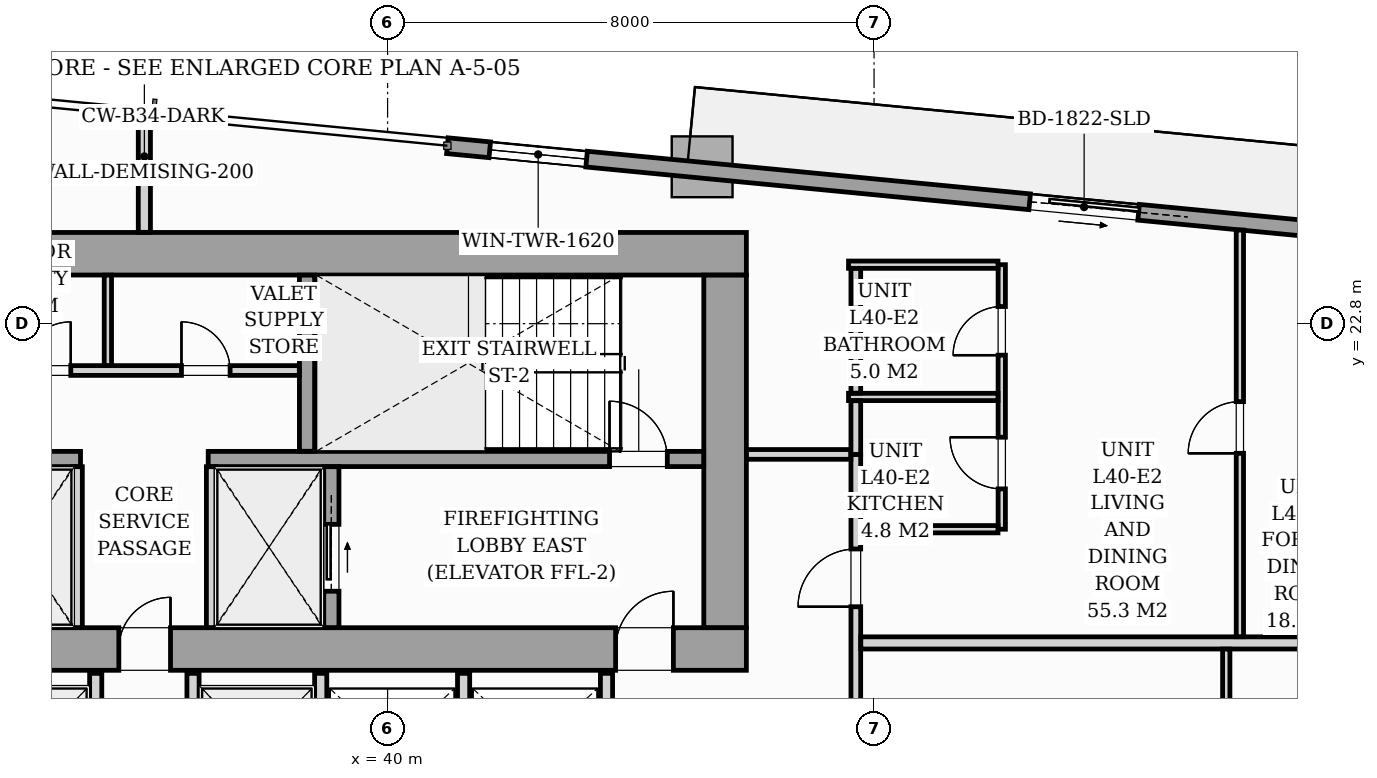
"""IFC4 building model, lengths in metres.
Left out: names, types, materials, properties, quantities, classifications, styles, units other than length and angle.
Written with IfcOpenShell. Run it as: python <this file> out.ifc"""

import sys

from ifc_helpers import new_model, si_unit, direction, frame, frame_2d, origin, origin_2d, place, context, subcontext, project, spatial, rectangle, i_section, extrude, source, transform, mapped, element, fill, save


model = new_model("IFC4")
c1 = context("Model", 3, precision=1e-05, world=origin(), true_north=direction((0.0, 1.0)))
c2 = subcontext(c1, "Body", "Model", "MODEL_VIEW")
j1 = project(units=[si_unit("LENGTHUNIT", "METRE"), si_unit("PLANEANGLEUNIT", "RADIAN")], contexts=[c1])
p1 = place(None, origin())
s1 = spatial("IfcSite", under=j1, at=p1, CompositionType="ELEMENT")
p2 = place(p1, origin())
s2 = spatial("IfcBuilding", under=s1, at=p2, CompositionType="ELEMENT")
p3 = place(p2, frame((0.0, 0.0, 140.6)))
s3 = spatial("IfcBuildingStorey", under=s2, at=p3, CompositionType="ELEMENT", Elevation=140.6)
m1 = source(origin(), c2, "Body", "SweptSolid", [
    extrude(i_section(OverallWidth=0.421, OverallDepth=0.465, WebThickness=0.045, FlangeThickness=0.073, FilletRadius=0.018, at=origin_2d()), origin(), (0.0, 0.0, 1.0), 3.196),
])
for number, where, z_axis, x_axis in (
    (1, (38.88, 17.4, 0.002), (0.0, 0.0, 1.0), (1.0, 0.0, 0.0)),
    (2, (45.6, 17.4, 0.002), (0.0, 0.0, 1.0), (1.0, 0.0, 0.0)),
    (3, (38.88, 24.0, 0.002), (0.0, 0.0, 1.0), (1.0, 0.0, 0.0)),
    (4, (45.6, 24.0, 0.002), (0.0, 0.0, 1.0), (1.0, 0.0, 0.0)),
):
    element("IfcColumn", number, at=place(p3, frame(where, z_axis=z_axis, x_axis=x_axis)), inside=s3, PredefinedType="PILASTER", context=c2, shape_type="MappedRepresentation", body=[
        mapped(m1, transform((0.0, 0.0, 0.0), scale=1.0)),
    ])
m2 = source(origin(), c2, "Body", "SweptSolid", [
    extrude(rectangle(XDim=1.0, YDim=1.0, at=origin_2d()), origin(), (0.0, 0.0, 1.0), 3.196),
])
p4 = place(p3, frame((45.173, 25.38, 0.002), z_axis=(0.0, 0.0, 1.0), x_axis=(0.995396198367, -0.09584575252, 0.0)))
e5 = element("IfcColumn", 5, at=p4, inside=s3, PredefinedType="COLUMN", context=c2, shape_type="MappedRepresentation", body=[
    mapped(m2, transform((0.0, 0.0, 0.0), scale=1.0)),
])
p5 = place(p3, frame((40.983, 25.727, 0.0), z_axis=(0.0, 0.0, 1.0), x_axis=(0.995395844771, -0.095849424686, 0.0)))
e6 = element("IfcWall", 6, at=p5, inside=s3, PredefinedType="STANDARD", context=c2, shape_type="SweptSolid", body=[
    extrude(rectangle(XDim=17.01, YDim=0.26, at=frame_2d((8.505, 0.0))), origin(), (0.0, 0.0, 1.0), 2.94),
])
p6 = place(p5, frame((9.62, 0.0, 0.0)))
e7 = element("IfcOpeningElement", 7, at=p6, cuts=e6, PredefinedType="OPENING", context=c2, shape_type="SweptSolid", body=[
    extrude(rectangle(XDim=1.8, YDim=2.06, at=frame_2d((0.9, 1.03))), frame((0.0, 0.14, 0.0), z_axis=(0.0, -1.0, 0.0), x_axis=(1.0, 0.0, 0.0)), (0.0, 0.0, 1.0), 0.28),
])
p7 = place(p5, frame((0.7, 0.0, 0.65)))
e8 = element("IfcOpeningElement", 8, at=p7, cuts=e6, PredefinedType="OPENING", context=c2, shape_type="SweptSolid", body=[
    extrude(rectangle(XDim=1.6, YDim=1.5, at=frame_2d((0.8, 0.75))), frame((0.0, 0.14, 0.0), z_axis=(0.0, -1.0, 0.0), x_axis=(1.0, 0.0, 0.0)), (0.0, 0.0, 1.0), 0.28),
])
p8 = place(p3, frame((26.1, 17.45, 0.0), z_axis=(0.0, 0.0, 1.0), x_axis=(1.0, 0.0, 0.0)))
e9 = element("IfcWall", 9, at=p8, inside=s3, PredefinedType="SHEAR", context=c2, shape_type="SweptSolid", body=[
    extrude(rectangle(XDim=19.8, YDim=0.7, at=frame_2d((9.9, 0.0))), origin(), (0.0, 0.0, 1.0), 3.2),
])
p9 = place(p8, frame((1.05, 0.0, 0.0)))
e10 = element("IfcOpeningElement", 10, at=p9, cuts=e9, PredefinedType="OPENING", context=c2, shape_type="SweptSolid", body=[
    extrude(rectangle(XDim=0.95, YDim=2.06, at=frame_2d((0.475, 1.03))), frame((0.0, 0.36, 0.0), z_axis=(0.0, -1.0, 0.0), x_axis=(1.0, 0.0, 0.0)), (0.0, 0.0, 1.0), 0.72),
])
p10 = place(p8, frame((9.48, 0.0, 0.0)))
e11 = element("IfcOpeningElement", 11, at=p10, cuts=e9, PredefinedType="OPENING", context=c2, shape_type="SweptSolid", body=[
    extrude(rectangle(XDim=0.85, YDim=2.0, at=frame_2d((0.425, 1.0))), frame((0.0, 0.36, 0.0), z_axis=(0.0, -1.0, 0.0), x_axis=(1.0, 0.0, 0.0)), (0.0, 0.0, 1.0), 0.72),
])
p11 = place(p8, frame((17.65, 0.0, 0.0)))
e12 = element("IfcOpeningElement", 12, at=p11, cuts=e9, PredefinedType="OPENING", context=c2, shape_type="SweptSolid", body=[
    extrude(rectangle(XDim=0.95, YDim=2.06, at=frame_2d((0.475, 1.03))), frame((0.0, 0.36, 0.0), z_axis=(0.0, -1.0, 0.0), x_axis=(1.0, 0.0, 0.0)), (0.0, 0.0, 1.0), 0.72),
])
p12 = place(p3, frame((26.1, 23.95, 0.0), z_axis=(0.0, 0.0, 1.0), x_axis=(1.0, 0.0, 0.0)))
e13 = element("IfcWall", 13, at=p12, inside=s3, PredefinedType="SHEAR", context=c2, shape_type="SweptSolid", body=[
    extrude(rectangle(XDim=19.8, YDim=0.7, at=frame_2d((9.9, 0.0))), origin(), (0.0, 0.0, 1.0), 3.2),
])
p13 = place(p3, frame((45.55, 17.802, 0.0), z_axis=(0.0, 0.0, 1.0), x_axis=(0.0, 1.0, 0.0)))
e14 = element("IfcWall", 14, at=p13, inside=s3, PredefinedType="SHEAR", context=c2, shape_type="SweptSolid", body=[
    extrude(rectangle(XDim=5.796, YDim=0.7, at=frame_2d((2.898, 0.0))), origin(), (0.0, 0.0, 1.0), 3.2),
])
p14 = place(p3, frame((26.802, 20.575, 0.0), z_axis=(0.0, 0.0, 1.0), x_axis=(1.0, 0.0, 0.0)))
e15 = element("IfcWall", 15, at=p14, inside=s3, PredefinedType="SOLIDWALL", context=c2, shape_type="SweptSolid", body=[
    extrude(rectangle(XDim=8.148, YDim=0.25, at=frame_2d((4.074, 0.0))), origin(), (0.0, 0.0, 1.0), 3.2),
])
p15 = place(p14, frame((0.348, 0.0, 0.0)))
e16 = element("IfcOpeningElement", 16, at=p15, cuts=e15, PredefinedType="OPENING", context=c2, shape_type="SweptSolid", body=[
    extrude(rectangle(XDim=0.95, YDim=2.06, at=frame_2d((0.475, 1.03))), frame((0.0, 0.135, 0.0), z_axis=(0.0, -1.0, 0.0), x_axis=(1.0, 0.0, 0.0)), (0.0, 0.0, 1.0), 0.27),
])
p16 = place(p3, frame((37.05, 20.575, 0.0), z_axis=(0.0, 0.0, 1.0), x_axis=(1.0, 0.0, 0.0)))
e17 = element("IfcWall", 17, at=p16, inside=s3, PredefinedType="SOLIDWALL", context=c2, shape_type="SweptSolid", body=[
    extrude(rectangle(XDim=8.148, YDim=0.25, at=frame_2d((4.074, 0.0))), origin(), (0.0, 0.0, 1.0), 3.2),
])
p17 = place(p16, frame((6.6, 0.0, 0.0)))
e18 = element("IfcOpeningElement", 18, at=p17, cuts=e17, PredefinedType="OPENING", context=c2, shape_type="SweptSolid", body=[
    extrude(rectangle(XDim=0.95, YDim=2.06, at=frame_2d((0.475, 1.03))), frame((0.0, 0.135, 0.0), z_axis=(0.0, -1.0, 0.0), x_axis=(1.0, 0.0, 0.0)), (0.0, 0.0, 1.0), 0.27),
])
p18 = place(p3, frame((38.675, 20.702, 0.0), z_axis=(0.0, 0.0, 1.0), x_axis=(0.0, 1.0, 0.0)))
e19 = element("IfcWall", 19, at=p18, inside=s3, PredefinedType="SOLIDWALL", context=c2, shape_type="SweptSolid", body=[
    extrude(rectangle(XDim=2.896, YDim=0.25, at=frame_2d((1.448, 0.0))), origin(), (0.0, 0.0, 1.0), 3.2),
])
for number, where, z_axis, x_axis in (
    (20, (34.9, 17.802, 0.0), (0.0, 0.0, 1.0), (0.0, 1.0, 0.0)),
    (21, (37.1, 17.802, 0.0), (0.0, 0.0, 1.0), (0.0, 1.0, 0.0)),
):
    element("IfcWall", number, at=place(p3, frame(where, z_axis=z_axis, x_axis=x_axis)), inside=s3, PredefinedType="PARTITIONING", context=c2, shape_type="SweptSolid", body=[
        extrude(rectangle(XDim=2.646, YDim=0.16, at=frame_2d((1.323, 0.0))), origin(), (0.0, 0.0, 1.0), 2.94),
    ])
p19 = place(p3, frame((39.075, 17.802, 0.0), z_axis=(0.0, 0.0, 1.0), x_axis=(0.0, 1.0, 0.0)))
e22 = element("IfcWall", 22, at=p19, inside=s3, PredefinedType="SOLIDWALL", context=c2, shape_type="SweptSolid", body=[
    extrude(rectangle(XDim=2.646, YDim=0.25, at=frame_2d((1.323, 0.0))), origin(), (0.0, 0.0, 1.0), 3.2),
])
p20 = place(p19, frame((0.598, 0.0, 0.0)))
e23 = element("IfcOpeningElement", 23, at=p20, cuts=e22, PredefinedType="OPENING", context=c2, shape_type="SweptSolid", body=[
    extrude(rectangle(XDim=1.1, YDim=2.08, at=frame_2d((0.55, 1.04))), frame((0.0, 0.135, 0.0), z_axis=(0.0, -1.0, 0.0), x_axis=(1.0, 0.0, 0.0)), (0.0, 0.0, 1.0), 0.27),
])
p21 = place(p3, frame((33.452, 22.03, 0.0), z_axis=(0.0, 0.0, 1.0), x_axis=(1.0, 0.0, 0.0)))
e24 = element("IfcWall", 24, at=p21, inside=s3, PredefinedType="PARTITIONING", context=c2, shape_type="SweptSolid", body=[
    extrude(rectangle(XDim=5.096, YDim=0.16, at=frame_2d((2.548, 0.0))), origin(), (0.0, 0.0, 1.0), 2.94),
])
p22 = place(p21, frame((0.538, 0.0, 0.0)))
e25 = element("IfcOpeningElement", 25, at=p22, cuts=e24, PredefinedType="OPENING", context=c2, shape_type="SweptSolid", body=[
    extrude(rectangle(XDim=0.8, YDim=2.05, at=frame_2d((0.4, 1.025))), frame((0.0, 0.09, 0.0), z_axis=(0.0, -1.0, 0.0), x_axis=(1.0, 0.0, 0.0)), (0.0, 0.0, 1.0), 0.18),
])
p23 = place(p21, frame((3.158, 0.0, 0.0)))
e26 = element("IfcOpeningElement", 26, at=p23, cuts=e24, PredefinedType="OPENING", context=c2, shape_type="SweptSolid", body=[
    extrude(rectangle(XDim=0.8, YDim=2.05, at=frame_2d((0.4, 1.025))), frame((0.0, 0.09, 0.0), z_axis=(0.0, -1.0, 0.0), x_axis=(1.0, 0.0, 0.0)), (0.0, 0.0, 1.0), 0.18),
])
p24 = place(p3, frame((35.4, 22.112, 0.0), z_axis=(0.0, 0.0, 1.0), x_axis=(0.0, 1.0, 0.0)))
e27 = element("IfcWall", 27, at=p24, inside=s3, PredefinedType="PARTITIONING", context=c2, shape_type="SweptSolid", body=[
    extrude(rectangle(XDim=1.486, YDim=0.12, at=frame_2d((0.743, 0.0))), origin(), (0.0, 0.0, 1.0), 2.94),
])
for number, where, z_axis, x_axis in (
    (28, (35.2, 14.75, 0.0), (0.0, 0.0, 1.0), (0.0, 1.0, 0.0)),
    (29, (36.8, 14.75, 0.0), (0.0, 0.0, 1.0), (0.0, 1.0, 0.0)),
    (30, (38.9, 14.75, 0.0), (0.0, 0.0, 1.0), (0.0, 1.0, 0.0)),
    (31, (41.25, 14.75, 0.0), (0.0, 0.0, 1.0), (0.0, 1.0, 0.0)),
    (32, (43.6, 14.75, 0.0), (0.0, 0.0, 1.0), (0.0, 1.0, 0.0)),
):
    element("IfcWall", number, at=place(p3, frame(where, z_axis=z_axis, x_axis=x_axis)), inside=s3, PredefinedType="PARTITIONING", context=c2, shape_type="SweptSolid", body=[
        extrude(rectangle(XDim=2.3, YDim=0.2, at=frame_2d((1.15, 0.0))), origin(), (0.0, 0.0, 1.0), 2.94),
    ])
p25 = place(p3, frame((47.7, 12.832, 0.0), z_axis=(0.0, 0.0, 1.0), x_axis=(0.0, 1.0, 0.0)))
e33 = element("IfcWall", 33, at=p25, inside=s3, PredefinedType="PARTITIONING", context=c2, shape_type="SweptSolid", body=[
    extrude(rectangle(XDim=7.818, YDim=0.16, at=frame_2d((3.909, 0.0))), origin(), (0.0, 0.0, 1.0), 2.94),
])
p26 = place(p25, frame((0.493, 0.0, 0.0)))
e34 = element("IfcOpeningElement", 34, at=p26, cuts=e33, PredefinedType="OPENING", context=c2, shape_type="SweptSolid", body=[
    extrude(rectangle(XDim=0.95, YDim=2.06, at=frame_2d((0.475, 1.03))), frame((0.0, 0.09, 0.0), z_axis=(0.0, -1.0, 0.0), x_axis=(1.0, 0.0, 0.0)), (0.0, 0.0, 1.0), 0.18),
])
p27 = place(p25, frame((5.313, 0.0, 0.0)))
e35 = element("IfcOpeningElement", 35, at=p27, cuts=e33, PredefinedType="OPENING", context=c2, shape_type="SweptSolid", body=[
    extrude(rectangle(XDim=0.95, YDim=2.06, at=frame_2d((0.475, 1.03))), frame((0.0, 0.09, 0.0), z_axis=(0.0, -1.0, 0.0), x_axis=(1.0, 0.0, 0.0)), (0.0, 0.0, 1.0), 0.18),
])
p28 = place(p3, frame((36.0, 24.302, 0.0), z_axis=(0.0, 0.0, 1.0), x_axis=(0.0, 1.0, 0.0)))
e36 = element("IfcWall", 36, at=p28, inside=s3, PredefinedType="PARTITIONING", context=c2, shape_type="SweptSolid", body=[
    extrude(rectangle(XDim=1.955, YDim=0.2, at=frame_2d((0.978, 0.0))), origin(), (0.0, 0.0, 1.0), 2.94),
])
p29 = place(p3, frame((45.902, 20.65, 0.0), z_axis=(0.0, 0.0, 1.0), x_axis=(1.0, 0.0, 0.0)))
e37 = element("IfcWall", 37, at=p29, inside=s3, PredefinedType="PARTITIONING", context=c2, shape_type="SweptSolid", body=[
    extrude(rectangle(XDim=1.716, YDim=0.16, at=frame_2d((0.858, 0.0))), origin(), (0.0, 0.0, 1.0), 2.94),
])
p30 = place(p3, frame((47.782, 17.55, 0.0), z_axis=(0.0, 0.0, 1.0), x_axis=(1.0, 0.0, 0.0)))
e38 = element("IfcWall", 38, at=p30, inside=s3, PredefinedType="PARTITIONING", context=c2, shape_type="SweptSolid", body=[
    extrude(rectangle(XDim=11.934, YDim=0.2, at=frame_2d((5.967, 0.0))), origin(), (0.0, 0.0, 1.0), 2.94),
])
p31 = place(p3, frame((53.792, 7.081, 0.0), z_axis=(0.0, 0.0, 1.0), x_axis=(0.0, 1.0, 0.0)))
e39 = element("IfcWall", 39, at=p31, inside=s3, PredefinedType="PARTITIONING", context=c2, shape_type="SweptSolid", body=[
    extrude(rectangle(XDim=10.367, YDim=0.12, at=frame_2d((5.184, 0.0))), origin(), (0.0, 0.0, 1.0), 2.94),
])
p32 = place(p31, frame((4.758, 0.0, 0.0)))
e40 = element("IfcOpeningElement", 40, at=p32, cuts=e39, PredefinedType="OPENING", context=c2, shape_type="SweptSolid", body=[
    extrude(rectangle(XDim=0.85, YDim=2.05, at=frame_2d((0.425, 1.025))), frame((0.0, 0.07, 0.0), z_axis=(0.0, -1.0, 0.0), x_axis=(1.0, 0.0, 0.0)), (0.0, 0.0, 1.0), 0.14),
])
p33 = place(p3, frame((50.1, 19.42, 0.0), z_axis=(0.0, 0.0, 1.0), x_axis=(0.0, 1.0, 0.0)))
e41 = element("IfcWall", 41, at=p33, inside=s3, PredefinedType="PARTITIONING", context=c2, shape_type="SweptSolid", body=[
    extrude(rectangle(XDim=4.35, YDim=0.12, at=frame_2d((2.175, 0.0))), origin(), (0.0, 0.0, 1.0), 2.94),
])
p34 = place(p33, frame((0.663, 0.0, 0.0)))
e42 = element("IfcOpeningElement", 42, at=p34, cuts=e41, PredefinedType="OPENING", context=c2, shape_type="SweptSolid", body=[
    extrude(rectangle(XDim=0.85, YDim=2.05, at=frame_2d((0.425, 1.025))), frame((0.0, 0.07, 0.0), z_axis=(0.0, -1.0, 0.0), x_axis=(1.0, 0.0, 0.0)), (0.0, 0.0, 1.0), 0.14),
])
p35 = place(p33, frame((2.862, 0.0, 0.0)))
e43 = element("IfcOpeningElement", 43, at=p35, cuts=e41, PredefinedType="OPENING", context=c2, shape_type="SweptSolid", body=[
    extrude(rectangle(XDim=0.8, YDim=2.02, at=frame_2d((0.4, 1.01))), frame((0.0, 0.07, 0.0), z_axis=(0.0, -1.0, 0.0), x_axis=(1.0, 0.0, 0.0)), (0.0, 0.0, 1.0), 0.14),
])
p36 = place(p3, frame((47.58, 21.595, 0.0), z_axis=(0.0, 0.0, 1.0), x_axis=(1.0, 0.0, 0.0)))
e44 = element("IfcWall", 44, at=p36, inside=s3, PredefinedType="PARTITIONING", context=c2, shape_type="SweptSolid", body=[
    extrude(rectangle(XDim=2.458, YDim=0.12, at=frame_2d((1.229, 0.0))), origin(), (0.0, 0.0, 1.0), 2.94),
])
p37 = place(p3, frame((47.782, 19.42, 0.0), z_axis=(0.0, 0.0, 1.0), x_axis=(1.0, 0.0, 0.0)))
e45 = element("IfcWall", 45, at=p37, inside=s3, PredefinedType="PARTITIONING", context=c2, shape_type="SweptSolid", body=[
    extrude(rectangle(XDim=2.256, YDim=0.12, at=frame_2d((1.128, 0.0))), origin(), (0.0, 0.0, 1.0), 2.94),
])
p38 = place(p3, frame((47.58, 23.77, 0.0), z_axis=(0.0, 0.0, 1.0), x_axis=(1.0, 0.0, 0.0)))
e46 = element("IfcWall", 46, at=p38, inside=s3, PredefinedType="PARTITIONING", context=c2, shape_type="SweptSolid", body=[
    extrude(rectangle(XDim=2.458, YDim=0.12, at=frame_2d((1.229, 0.0))), origin(), (0.0, 0.0, 1.0), 2.216),
])
p39 = place(p3, frame((47.7, 20.65, 0.0), z_axis=(0.0, 0.0, 1.0), x_axis=(0.0, 1.0, 0.0)))
e47 = element("IfcWall", 47, at=p39, inside=s3, PredefinedType="PARTITIONING", context=c2, shape_type="SweptSolid", body=[
    extrude(rectangle(XDim=0.883, YDim=0.16, at=frame_2d((0.441, 0.0))), origin(), (0.0, 0.0, 1.0), 2.94),
])
p40 = place(p3, frame((47.7, 21.657, 0.0), z_axis=(0.0, 0.0, 1.0), x_axis=(0.0, 1.0, 0.0)))
e48 = element("IfcWall", 48, at=p40, inside=s3, PredefinedType="PARTITIONING", context=c2, shape_type="SweptSolid", body=[
    extrude(rectangle(XDim=2.051, YDim=0.16, at=frame_2d((1.025, 0.0))), origin(), (0.0, 0.0, 1.0), 2.94),
])
p41 = place(p3, frame((54.016, 17.652, 0.0), z_axis=(0.0, 0.0, 1.0), x_axis=(0.0, 1.0, 0.0)))
e49 = element("IfcWall", 49, at=p41, inside=s3, PredefinedType="PARTITIONING", context=c2, shape_type="SweptSolid", body=[
    extrude(rectangle(XDim=6.687, YDim=0.12, at=frame_2d((3.344, 0.0))), origin(), (0.0, 0.0, 1.0), 2.94),
])
p42 = place(p41, frame((3.016, 0.0, 0.0)))
e50 = element("IfcOpeningElement", 50, at=p42, cuts=e49, PredefinedType="OPENING", context=c2, shape_type="SweptSolid", body=[
    extrude(rectangle(XDim=0.85, YDim=2.05, at=frame_2d((0.425, 1.025))), frame((0.0, 0.07, 0.0), z_axis=(0.0, -1.0, 0.0), x_axis=(1.0, 0.0, 0.0)), (0.0, 0.0, 1.0), 0.14),
])
m3 = source(origin(), c2, "Body", "SweptSolid", [
    extrude(rectangle(XDim=1.8, YDim=2.06, at=frame_2d((0.9, 1.03))), frame((0.0, 0.025, 0.0), z_axis=(0.0, -1.0, 0.0), x_axis=(1.0, 0.0, 0.0)), (0.0, 0.0, 1.0), 0.05),
])
p43 = place(p6, origin())
e51 = element("IfcDoor", 51, at=p43, inside=s3, OperationType="SLIDING_TO_RIGHT", PredefinedType="DOOR", context=c2, shape_type="MappedRepresentation", body=[
    mapped(m3, transform((0.0, 0.0, 0.0), scale=1.0)),
])
fill(e7, e51)
m4 = source(origin(), c2, "Body", "SweptSolid", [
    extrude(rectangle(XDim=1.6, YDim=1.5, at=frame_2d((0.8, 0.75))), frame((0.0, 0.03, 0.0), z_axis=(0.0, -1.0, 0.0), x_axis=(1.0, 0.0, 0.0)), (0.0, 0.0, 1.0), 0.06),
])
p44 = place(p7, origin())
e52 = element("IfcWindow", 52, at=p44, inside=s3, PartitioningType="SINGLE_PANEL", PredefinedType="WINDOW", context=c2, shape_type="MappedRepresentation", body=[
    mapped(m4, transform((0.0, 0.0, 0.0), scale=1.0)),
])
fill(e8, e52)
m5 = source(origin(), c2, "Body", "SweptSolid", [
    extrude(rectangle(XDim=0.85, YDim=2.0, at=frame_2d((0.425, 1.0))), frame((0.0, 0.025, 0.0), z_axis=(0.0, -1.0, 0.0), x_axis=(1.0, 0.0, 0.0)), (0.0, 0.0, 1.0), 0.05),
])
p45 = place(p10, origin())
e53 = element("IfcDoor", 53, at=p45, inside=s3, OperationType="SINGLE_SWING_RIGHT", PredefinedType="DOOR", context=c2, shape_type="MappedRepresentation", body=[
    mapped(m5, transform((0.0, 0.0, 0.0), scale=1.0)),
])
fill(e11, e53)
m6 = source(origin(), c2, "Body", "SweptSolid", [
    extrude(rectangle(XDim=0.95, YDim=2.06, at=frame_2d((0.475, 1.03))), frame((0.0, 0.025, 0.0), z_axis=(0.0, -1.0, 0.0), x_axis=(1.0, 0.0, 0.0)), (0.0, 0.0, 1.0), 0.05),
])
p46 = place(p11, origin())
e54 = element("IfcDoor", 54, at=p46, inside=s3, OperationType="SINGLE_SWING_RIGHT", PredefinedType="DOOR", context=c2, shape_type="MappedRepresentation", body=[
    mapped(m6, transform((0.0, 0.0, 0.0), scale=1.0)),
])
fill(e12, e54)
p47 = place(p17, origin())
e55 = element("IfcDoor", 55, at=p47, inside=s3, OperationType="SINGLE_SWING_LEFT", PredefinedType="DOOR", context=c2, shape_type="MappedRepresentation", body=[
    mapped(m6, transform((0.0, 0.0, 0.0), scale=1.0)),
])
fill(e18, e55)
m7 = source(origin(), c2, "Body", "SweptSolid", [
    extrude(rectangle(XDim=1.1, YDim=2.08, at=frame_2d((0.55, 1.04))), frame((0.0, 0.025, 0.0), z_axis=(0.0, -1.0, 0.0), x_axis=(1.0, 0.0, 0.0)), (0.0, 0.0, 1.0), 0.05),
])
p48 = place(p20, origin())
e56 = element("IfcDoor", 56, at=p48, inside=s3, OperationType="SLIDING_TO_RIGHT", PredefinedType="DOOR", context=c2, shape_type="MappedRepresentation", body=[
    mapped(m7, transform((0.0, 0.0, 0.0), scale=1.0)),
])
fill(e23, e56)
m8 = source(origin(), c2, "Body", "SweptSolid", [
    extrude(rectangle(XDim=0.8, YDim=2.05, at=frame_2d((0.4, 1.025))), frame((0.0, 0.025, 0.0), z_axis=(0.0, -1.0, 0.0), x_axis=(1.0, 0.0, 0.0)), (0.0, 0.0, 1.0), 0.05),
])
p49 = place(p22, origin())
e57 = element("IfcDoor", 57, at=p49, inside=s3, OperationType="SINGLE_SWING_RIGHT", PredefinedType="DOOR", context=c2, shape_type="MappedRepresentation", body=[
    mapped(m8, transform((0.0, 0.0, 0.0), scale=1.0)),
])
fill(e25, e57)
p50 = place(p23, origin())
e58 = element("IfcDoor", 58, at=p50, inside=s3, OperationType="SINGLE_SWING_LEFT", PredefinedType="DOOR", context=c2, shape_type="MappedRepresentation", body=[
    mapped(m8, transform((0.0, 0.0, 0.0), scale=1.0)),
])
fill(e26, e58)
m9 = source(origin(), c2, "Body", "SweptSolid", [
    extrude(rectangle(XDim=0.95, YDim=2.06, at=frame_2d((0.475, 1.03))), frame((0.0, 0.025, 0.0), z_axis=(0.0, -1.0, 0.0), x_axis=(1.0, 0.0, 0.0)), (0.0, 0.0, 1.0), 0.05),
])
p51 = place(p27, origin())
e59 = element("IfcDoor", 59, at=p51, inside=s3, OperationType="SINGLE_SWING_LEFT", PredefinedType="DOOR", context=c2, shape_type="MappedRepresentation", body=[
    mapped(m9, transform((0.0, 0.0, 0.0), scale=1.0)),
])
fill(e35, e59)
m10 = source(origin(), c2, "Body", "SweptSolid", [
    extrude(rectangle(XDim=0.85, YDim=2.05, at=frame_2d((0.425, 1.025))), frame((0.0, 0.025, 0.0), z_axis=(0.0, -1.0, 0.0), x_axis=(1.0, 0.0, 0.0)), (0.0, 0.0, 1.0), 0.05),
])
p52 = place(p34, origin())
e60 = element("IfcDoor", 60, at=p52, inside=s3, OperationType="SINGLE_SWING_RIGHT", PredefinedType="DOOR", context=c2, shape_type="MappedRepresentation", body=[
    mapped(m10, transform((0.0, 0.0, 0.0), scale=1.0)),
])
fill(e42, e60)
m11 = source(origin(), c2, "Body", "SweptSolid", [
    extrude(rectangle(XDim=0.8, YDim=2.02, at=frame_2d((0.4, 1.01))), frame((0.0, 0.025, 0.0), z_axis=(0.0, -1.0, 0.0), x_axis=(1.0, 0.0, 0.0)), (0.0, 0.0, 1.0), 0.05),
])
p53 = place(p35, origin())
e61 = element("IfcDoor", 61, at=p53, inside=s3, OperationType="SINGLE_SWING_LEFT", PredefinedType="DOOR", context=c2, shape_type="MappedRepresentation", body=[
    mapped(m11, transform((0.0, 0.0, 0.0), scale=1.0)),
])
fill(e43, e61)
p54 = place(p42, origin())
e62 = element("IfcDoor", 62, at=p54, inside=s3, OperationType="SINGLE_SWING_LEFT", PredefinedType="DOOR", context=c2, shape_type="MappedRepresentation", body=[
    mapped(m10, transform((0.0, 0.0, 0.0), scale=1.0)),
])
fill(e50, e62)
save(model, sys.argv[1])
